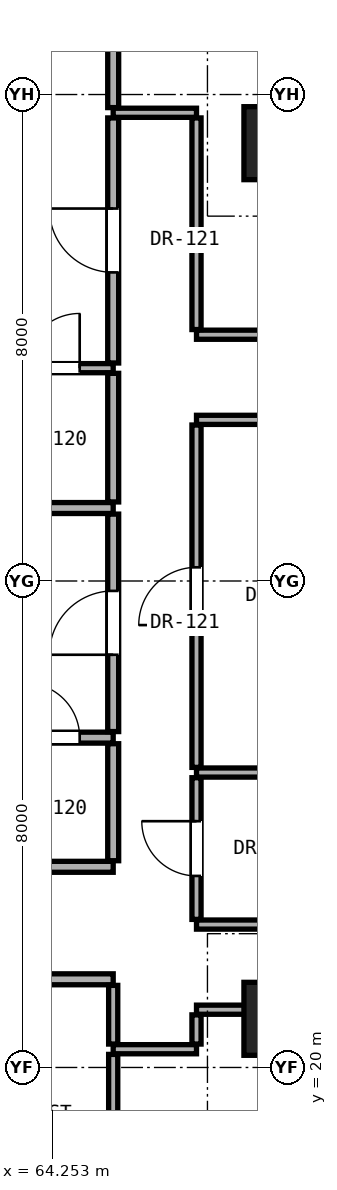
"""IFC4 building model, lengths in metres.
Left out: names, types, materials, properties, quantities, classifications, styles, units other than length and angle.
Written with IfcOpenShell. Run it as: python <this file> out.ifc"""

import sys

from ifc_helpers import new_model, si_unit, direction, frame, frame_2d, origin, origin_2d, place, context, subcontext, project, spatial, rectangle, extrude, element, fill, save


model = new_model("IFC4")
c1 = context("Model", 3, precision=1e-05, world=origin(), true_north=direction((0.0, 1.0)))
c2 = subcontext(c1, "Body", "Model", "MODEL_VIEW")
j1 = project(units=[si_unit("LENGTHUNIT", "METRE"), si_unit("PLANEANGLEUNIT", "RADIAN")], contexts=[c1])
p1 = place(None, origin())
s1 = spatial("IfcSite", under=j1, at=p1, CompositionType="ELEMENT")
p2 = place(p1, origin())
s2 = spatial("IfcBuilding", under=s1, at=p2, CompositionType="ELEMENT")
p3 = place(p2, frame((0.0, 0.0, 91.7)))
s3 = spatial("IfcBuildingStorey", under=s2, at=p3, CompositionType="ELEMENT", Elevation=91.7)
for number, where, z_axis, x_axis in (
    (1, (68.0, 20.8, 0.0), (0.0, 0.0, 1.0), (1.0, 0.0, 0.0)),
    (2, (68.0, 35.2, 0.0), (0.0, 0.0, 1.0), (1.0, 0.0, 0.0)),
):
    element("IfcColumn", number, at=place(p3, frame(where, z_axis=z_axis, x_axis=x_axis)), inside=s3, PredefinedType="COLUMN", context=c2, shape_type="SweptSolid", body=[
        extrude(rectangle(XDim=1.2, YDim=1.2, at=origin_2d()), origin(), (0.0, 0.0, 1.0), 3.3),
    ])
p4 = place(p3, frame((65.25, 20.3, 0.0), z_axis=(0.0, 0.0, 1.0), x_axis=(1.0, 0.0, 0.0)))
e3 = element("IfcWall", 3, at=p4, inside=s3, PredefinedType="PARTITIONING", context=c2, shape_type="SweptSolid", body=[
    extrude(rectangle(XDim=1.37, YDim=0.15, at=frame_2d((0.685, 0.0))), origin(), (0.0, 0.0, 1.0), 3.08),
])
p5 = place(p3, frame((66.62, 20.95, 0.0), z_axis=(0.0, 0.0, 1.0), x_axis=(1.0, 0.0, 0.0)))
e4 = element("IfcWall", 4, at=p5, inside=s3, PredefinedType="PARTITIONING", context=c2, shape_type="SweptSolid", body=[
    extrude(rectangle(XDim=1.06, YDim=0.15, at=frame_2d((0.53, 0.0))), origin(), (0.0, 0.0, 1.0), 2.472),
])
p6 = place(p3, frame((58.5, 21.45, 0.0), z_axis=(0.0, 0.0, 1.0), x_axis=(1.0, 0.0, 0.0)))
e5 = element("IfcWall", 5, at=p6, inside=s3, PredefinedType="PARTITIONING", context=c2, shape_type="SweptSolid", body=[
    extrude(rectangle(XDim=6.75, YDim=0.18, at=frame_2d((3.375, 0.0))), origin(), (0.0, 0.0, 1.0), 2.085),
])
p7 = place(p6, frame((4.355, 0.0, 0.0)))
e6 = element("IfcOpeningElement", 6, at=p7, cuts=e5, PredefinedType="OPENING", context=c2, shape_type="SweptSolid", body=[
    extrude(rectangle(XDim=0.85, YDim=2.01, at=frame_2d((0.425, 1.005))), frame((0.0, 0.1, 0.0), z_axis=(0.0, -1.0, 0.0), x_axis=(1.0, 0.0, 0.0)), (0.0, 0.0, 1.0), 0.2),
])
p8 = place(p3, frame((66.62, 22.35, 0.0), z_axis=(0.0, 0.0, 1.0), x_axis=(1.0, 0.0, 0.0)))
e7 = element("IfcWall", 7, at=p8, inside=s3, PredefinedType="PARTITIONING", context=c2, shape_type="SweptSolid", body=[
    extrude(rectangle(XDim=19.63, YDim=0.15, at=frame_2d((9.815, 0.0))), origin(), (0.0, 0.0, 1.0), 2.145),
])
p9 = place(p8, frame((12.085, 0.0, 0.0)))
e8 = element("IfcOpeningElement", 8, at=p9, cuts=e7, PredefinedType="OPENING", context=c2, shape_type="SweptSolid", body=[
    extrude(rectangle(XDim=0.85, YDim=2.01, at=frame_2d((0.425, 1.005))), frame((0.0, 0.085, 0.0), z_axis=(0.0, -1.0, 0.0), x_axis=(1.0, 0.0, 0.0)), (0.0, 0.0, 1.0), 0.17),
])
p10 = place(p3, frame((32.14, 23.3, 0.0), z_axis=(0.0, 0.0, 1.0), x_axis=(1.0, 0.0, 0.0)))
e9 = element("IfcWall", 9, at=p10, inside=s3, PredefinedType="PARTITIONING", context=c2, shape_type="SweptSolid", body=[
    extrude(rectangle(XDim=33.11, YDim=0.18, at=frame_2d((16.555, 0.0))), origin(), (0.0, 0.0, 1.0), 2.145),
])
p11 = place(p10, frame((11.525, 0.0, 0.0)))
e10 = element("IfcOpeningElement", 10, at=p11, cuts=e9, PredefinedType="OPENING", context=c2, shape_type="SweptSolid", body=[
    extrude(rectangle(XDim=0.85, YDim=2.01, at=frame_2d((0.425, 1.005))), frame((0.0, 0.1, 0.0), z_axis=(0.0, -1.0, 0.0), x_axis=(1.0, 0.0, 0.0)), (0.0, 0.0, 1.0), 0.2),
])
p12 = place(p10, frame((23.185, 0.0, 0.0)))
e11 = element("IfcOpeningElement", 11, at=p12, cuts=e9, PredefinedType="OPENING", context=c2, shape_type="SweptSolid", body=[
    extrude(rectangle(XDim=0.85, YDim=2.01, at=frame_2d((0.425, 1.005))), frame((0.0, 0.1, 0.0), z_axis=(0.0, -1.0, 0.0), x_axis=(1.0, 0.0, 0.0)), (0.0, 0.0, 1.0), 0.2),
])
p13 = place(p3, frame((66.62, 24.85, 0.0), z_axis=(0.0, 0.0, 1.0), x_axis=(1.0, 0.0, 0.0)))
e12 = element("IfcWall", 12, at=p13, inside=s3, PredefinedType="PARTITIONING", context=c2, shape_type="SweptSolid", body=[
    extrude(rectangle(XDim=3.13, YDim=0.15, at=frame_2d((1.565, 0.0))), origin(), (0.0, 0.0, 1.0), 2.145),
])
p14 = place(p3, frame((59.12, 25.424, 0.0), z_axis=(0.0, 0.0, 1.0), x_axis=(1.0, 0.0, 0.0)))
e13 = element("IfcWall", 13, at=p14, inside=s3, PredefinedType="PARTITIONING", context=c2, shape_type="SweptSolid", body=[
    extrude(rectangle(XDim=6.13, YDim=0.18, at=frame_2d((3.065, 0.0))), origin(), (0.0, 0.0, 1.0), 2.216),
])
p15 = place(p14, frame((1.629, 0.0, 0.0)))
e14 = element("IfcOpeningElement", 14, at=p15, cuts=e13, PredefinedType="OPENING", context=c2, shape_type="SweptSolid", body=[
    extrude(rectangle(XDim=0.95, YDim=2.15, at=frame_2d((0.475, 1.075))), frame((0.0, 0.1, 0.0), z_axis=(0.0, -1.0, 0.0), x_axis=(1.0, 0.0, 0.0)), (0.0, 0.0, 1.0), 0.2),
])
p16 = place(p14, frame((4.679, 0.0, 0.0)))
e15 = element("IfcOpeningElement", 15, at=p16, cuts=e13, PredefinedType="OPENING", context=c2, shape_type="SweptSolid", body=[
    extrude(rectangle(XDim=0.9, YDim=2.1, at=frame_2d((0.45, 1.05))), frame((0.0, 0.1, 0.0), z_axis=(0.0, -1.0, 0.0), x_axis=(1.0, 0.0, 0.0)), (0.0, 0.0, 1.0), 0.2),
])
p17 = place(p3, frame((59.12, 29.2, 0.0), z_axis=(0.0, 0.0, 1.0), x_axis=(1.0, 0.0, 0.0)))
e16 = element("IfcWall", 16, at=p17, inside=s3, PredefinedType="PARTITIONING", context=c2, shape_type="SweptSolid", body=[
    extrude(rectangle(XDim=6.13, YDim=0.18, at=frame_2d((3.065, 0.0))), origin(), (0.0, 0.0, 1.0), 2.216),
])
p18 = place(p3, frame((66.62, 30.65, 0.0), z_axis=(0.0, 0.0, 1.0), x_axis=(1.0, 0.0, 0.0)))
e17 = element("IfcWall", 17, at=p18, inside=s3, PredefinedType="PARTITIONING", context=c2, shape_type="SweptSolid", body=[
    extrude(rectangle(XDim=19.63, YDim=0.15, at=frame_2d((9.815, 0.0))), origin(), (0.0, 0.0, 1.0), 2.145),
])
p19 = place(p18, frame((3.855, 0.0, 0.0)))
e18 = element("IfcOpeningElement", 18, at=p19, cuts=e17, PredefinedType="OPENING", context=c2, shape_type="SweptSolid", body=[
    extrude(rectangle(XDim=0.85, YDim=2.01, at=frame_2d((0.425, 1.005))), frame((0.0, 0.085, 0.0), z_axis=(0.0, -1.0, 0.0), x_axis=(1.0, 0.0, 0.0)), (0.0, 0.0, 1.0), 0.17),
])
p20 = place(p18, frame((12.085, 0.0, 0.0)))
e19 = element("IfcOpeningElement", 19, at=p20, cuts=e17, PredefinedType="OPENING", context=c2, shape_type="SweptSolid", body=[
    extrude(rectangle(XDim=0.85, YDim=2.01, at=frame_2d((0.425, 1.005))), frame((0.0, 0.085, 0.0), z_axis=(0.0, -1.0, 0.0), x_axis=(1.0, 0.0, 0.0)), (0.0, 0.0, 1.0), 0.17),
])
p21 = place(p3, frame((59.12, 31.5, 0.0), z_axis=(0.0, 0.0, 1.0), x_axis=(1.0, 0.0, 0.0)))
e20 = element("IfcWall", 20, at=p21, inside=s3, PredefinedType="PARTITIONING", context=c2, shape_type="SweptSolid", body=[
    extrude(rectangle(XDim=6.13, YDim=0.15, at=frame_2d((3.065, 0.0))), origin(), (0.0, 0.0, 1.0), 2.216),
])
p22 = place(p21, frame((1.629, 0.0, 0.0)))
e21 = element("IfcOpeningElement", 21, at=p22, cuts=e20, PredefinedType="OPENING", context=c2, shape_type="SweptSolid", body=[
    extrude(rectangle(XDim=0.95, YDim=2.15, at=frame_2d((0.475, 1.075))), frame((0.0, 0.085, 0.0), z_axis=(0.0, -1.0, 0.0), x_axis=(1.0, 0.0, 0.0)), (0.0, 0.0, 1.0), 0.17),
])
p23 = place(p21, frame((4.679, 0.0, 0.0)))
e22 = element("IfcOpeningElement", 22, at=p23, cuts=e20, PredefinedType="OPENING", context=c2, shape_type="SweptSolid", body=[
    extrude(rectangle(XDim=0.9, YDim=2.1, at=frame_2d((0.45, 1.05))), frame((0.0, 0.085, 0.0), z_axis=(0.0, -1.0, 0.0), x_axis=(1.0, 0.0, 0.0)), (0.0, 0.0, 1.0), 0.17),
])
p24 = place(p3, frame((66.62, 32.05, 0.0), z_axis=(0.0, 0.0, 1.0), x_axis=(1.0, 0.0, 0.0)))
e23 = element("IfcWall", 23, at=p24, inside=s3, PredefinedType="PARTITIONING", context=c2, shape_type="SweptSolid", body=[
    extrude(rectangle(XDim=2.18, YDim=0.15, at=frame_2d((1.09, 0.0))), origin(), (0.0, 0.0, 1.0), 2.145),
])
p25 = place(p3, frame((65.25, 35.7, 0.0), z_axis=(0.0, 0.0, 1.0), x_axis=(1.0, 0.0, 0.0)))
e24 = element("IfcWall", 24, at=p25, inside=s3, PredefinedType="PARTITIONING", context=c2, shape_type="SweptSolid", body=[
    extrude(rectangle(XDim=1.37, YDim=0.15, at=frame_2d((0.685, 0.0))), origin(), (0.0, 0.0, 1.0), 3.08),
])
p26 = place(p3, frame((65.25, 16.92, 0.0), z_axis=(0.0, 0.0, 1.0), x_axis=(0.0, 1.0, 0.0)))
e25 = element("IfcWall", 25, at=p26, inside=s3, PredefinedType="PARTITIONING", context=c2, shape_type="SweptSolid", body=[
    extrude(rectangle(XDim=3.295, YDim=0.15, at=frame_2d((1.647, 0.0))), origin(), (0.0, 0.0, 1.0), 2.456),
])
p27 = place(p3, frame((65.25, 20.385, 0.0), z_axis=(0.0, 0.0, 1.0), x_axis=(0.0, 1.0, 0.0)))
e26 = element("IfcWall", 26, at=p27, inside=s3, PredefinedType="PARTITIONING", context=c2, shape_type="SweptSolid", body=[
    extrude(rectangle(XDim=0.965, YDim=0.15, at=frame_2d((0.482, 0.0))), origin(), (0.0, 0.0, 1.0), 2.472),
])
p28 = place(p3, frame((65.25, 23.4, 0.0), z_axis=(0.0, 0.0, 1.0), x_axis=(0.0, 1.0, 0.0)))
e27 = element("IfcWall", 27, at=p28, inside=s3, PredefinedType="PARTITIONING", context=c2, shape_type="SweptSolid", body=[
    extrude(rectangle(XDim=1.924, YDim=0.18, at=frame_2d((0.962, 0.0))), origin(), (0.0, 0.0, 1.0), 3.08),
])
p29 = place(p3, frame((65.25, 25.524, 0.0), z_axis=(0.0, 0.0, 1.0), x_axis=(0.0, 1.0, 0.0)))
e28 = element("IfcWall", 28, at=p29, inside=s3, PredefinedType="PARTITIONING", context=c2, shape_type="SweptSolid", body=[
    extrude(rectangle(XDim=3.576, YDim=0.18, at=frame_2d((1.788, 0.0))), origin(), (0.0, 0.0, 1.0), 2.299),
])
p30 = place(p29, frame((1.263, 0.0, 0.0)))
e29 = element("IfcOpeningElement", 29, at=p30, cuts=e28, PredefinedType="OPENING", context=c2, shape_type="SweptSolid", body=[
    extrude(rectangle(XDim=1.05, YDim=2.2, at=frame_2d((0.525, 1.1))), frame((0.0, 0.1, 0.0), z_axis=(0.0, -1.0, 0.0), x_axis=(1.0, 0.0, 0.0)), (0.0, 0.0, 1.0), 0.2),
])
p31 = place(p3, frame((65.25, 29.3, 0.0), z_axis=(0.0, 0.0, 1.0), x_axis=(0.0, 1.0, 0.0)))
e30 = element("IfcWall", 30, at=p31, inside=s3, PredefinedType="PARTITIONING", context=c2, shape_type="SweptSolid", body=[
    extrude(rectangle(XDim=2.115, YDim=0.18, at=frame_2d((1.058, 0.0))), origin(), (0.0, 0.0, 1.0), 3.08),
])
p32 = place(p3, frame((65.25, 31.585, 0.0), z_axis=(0.0, 0.0, 1.0), x_axis=(0.0, 1.0, 0.0)))
e31 = element("IfcWall", 31, at=p32, inside=s3, PredefinedType="PARTITIONING", context=c2, shape_type="SweptSolid", body=[
    extrude(rectangle(XDim=4.03, YDim=0.18, at=frame_2d((2.015, 0.0))), origin(), (0.0, 0.0, 1.0), 2.472),
])
p33 = place(p32, frame((1.49, 0.0, 0.0)))
e32 = element("IfcOpeningElement", 32, at=p33, cuts=e31, PredefinedType="OPENING", context=c2, shape_type="SweptSolid", body=[
    extrude(rectangle(XDim=1.05, YDim=2.2, at=frame_2d((0.525, 1.1))), frame((0.0, 0.1, 0.0), z_axis=(0.0, -1.0, 0.0), x_axis=(1.0, 0.0, 0.0)), (0.0, 0.0, 1.0), 0.2),
])
p34 = place(p3, frame((65.25, 35.785, 0.0), z_axis=(0.0, 0.0, 1.0), x_axis=(0.0, 1.0, 0.0)))
e33 = element("IfcWall", 33, at=p34, inside=s3, PredefinedType="PARTITIONING", context=c2, shape_type="SweptSolid", body=[
    extrude(rectangle(XDim=3.294, YDim=0.18, at=frame_2d((1.647, 0.0))), origin(), (0.0, 0.0, 1.0), 2.456),
])
p35 = place(p3, frame((66.62, 20.385, 0.0), z_axis=(0.0, 0.0, 1.0), x_axis=(0.0, 1.0, 0.0)))
e34 = element("IfcWall", 34, at=p35, inside=s3, PredefinedType="PARTITIONING", context=c2, shape_type="SweptSolid", body=[
    extrude(rectangle(XDim=0.48, YDim=0.15, at=frame_2d((0.24, 0.0))), origin(), (0.0, 0.0, 1.0), 2.472),
])
p36 = place(p3, frame((66.62, 22.435, 0.0), z_axis=(0.0, 0.0, 1.0), x_axis=(0.0, 1.0, 0.0)))
e35 = element("IfcWall", 35, at=p36, inside=s3, PredefinedType="PARTITIONING", context=c2, shape_type="SweptSolid", body=[
    extrude(rectangle(XDim=2.33, YDim=0.15, at=frame_2d((1.165, 0.0))), origin(), (0.0, 0.0, 1.0), 3.08),
])
p37 = place(p36, frame((0.715, 0.0, 0.0)))
e36 = element("IfcOpeningElement", 36, at=p37, cuts=e35, PredefinedType="OPENING", context=c2, shape_type="SweptSolid", body=[
    extrude(rectangle(XDim=0.9, YDim=2.1, at=frame_2d((0.45, 1.05))), frame((0.0, 0.085, 0.0), z_axis=(0.0, -1.0, 0.0), x_axis=(1.0, 0.0, 0.0)), (0.0, 0.0, 1.0), 0.17),
])
p38 = place(p3, frame((66.62, 24.935, 0.0), z_axis=(0.0, 0.0, 1.0), x_axis=(0.0, 1.0, 0.0)))
e37 = element("IfcWall", 37, at=p38, inside=s3, PredefinedType="PARTITIONING", context=c2, shape_type="SweptSolid", body=[
    extrude(rectangle(XDim=5.63, YDim=0.15, at=frame_2d((2.815, 0.0))), origin(), (0.0, 0.0, 1.0), 2.299),
])
p39 = place(p38, frame((2.34, 0.0, 0.0)))
e38 = element("IfcOpeningElement", 38, at=p39, cuts=e37, PredefinedType="OPENING", context=c2, shape_type="SweptSolid", body=[
    extrude(rectangle(XDim=0.95, YDim=2.15, at=frame_2d((0.475, 1.075))), frame((0.0, 0.085, 0.0), z_axis=(0.0, -1.0, 0.0), x_axis=(1.0, 0.0, 0.0)), (0.0, 0.0, 1.0), 0.17),
])
p40 = place(p3, frame((66.62, 32.135, 0.0), z_axis=(0.0, 0.0, 1.0), x_axis=(0.0, 1.0, 0.0)))
e39 = element("IfcWall", 39, at=p40, inside=s3, PredefinedType="PARTITIONING", context=c2, shape_type="SweptSolid", body=[
    extrude(rectangle(XDim=3.48, YDim=0.15, at=frame_2d((1.74, 0.0))), origin(), (0.0, 0.0, 1.0), 2.472),
])
p41 = place(p37, origin())
e40 = element("IfcDoor", 40, at=p41, inside=s3, OperationType="SINGLE_SWING_RIGHT", PredefinedType="DOOR", context=c2, shape_type="SweptSolid", body=[
    extrude(rectangle(XDim=0.9, YDim=2.1, at=frame_2d((0.45, 1.05))), frame((0.0, 0.025, 0.0), z_axis=(0.0, -1.0, 0.0), x_axis=(1.0, 0.0, 0.0)), (0.0, 0.0, 1.0), 0.05),
])
fill(e36, e40)
p42 = place(p30, origin())
e41 = element("IfcDoor", 41, at=p42, inside=s3, OperationType="SINGLE_SWING_LEFT", PredefinedType="DOOR", context=c2, shape_type="SweptSolid", body=[
    extrude(rectangle(XDim=1.05, YDim=2.2, at=frame_2d((0.525, 1.1))), frame((0.0, 0.025, 0.0), z_axis=(0.0, -1.0, 0.0), x_axis=(1.0, 0.0, 0.0)), (0.0, 0.0, 1.0), 0.05),
])
fill(e29, e41)
p43 = place(p16, origin())
e42 = element("IfcDoor", 42, at=p43, inside=s3, OperationType="SINGLE_SWING_LEFT", PredefinedType="DOOR", context=c2, shape_type="SweptSolid", body=[
    extrude(rectangle(XDim=0.9, YDim=2.1, at=frame_2d((0.45, 1.05))), frame((0.0, 0.025, 0.0), z_axis=(0.0, -1.0, 0.0), x_axis=(1.0, 0.0, 0.0)), (0.0, 0.0, 1.0), 0.05),
])
fill(e15, e42)
p44 = place(p33, origin())
e43 = element("IfcDoor", 43, at=p44, inside=s3, OperationType="SINGLE_SWING_RIGHT", PredefinedType="DOOR", context=c2, shape_type="SweptSolid", body=[
    extrude(rectangle(XDim=1.05, YDim=2.2, at=frame_2d((0.525, 1.1))), frame((0.0, 0.025, 0.0), z_axis=(0.0, -1.0, 0.0), x_axis=(1.0, 0.0, 0.0)), (0.0, 0.0, 1.0), 0.05),
])
fill(e32, e43)
p45 = place(p23, origin())
e44 = element("IfcDoor", 44, at=p45, inside=s3, OperationType="SINGLE_SWING_RIGHT", PredefinedType="DOOR", context=c2, shape_type="SweptSolid", body=[
    extrude(rectangle(XDim=0.9, YDim=2.1, at=frame_2d((0.45, 1.05))), frame((0.0, 0.025, 0.0), z_axis=(0.0, -1.0, 0.0), x_axis=(1.0, 0.0, 0.0)), (0.0, 0.0, 1.0), 0.05),
])
fill(e22, e44)
p46 = place(p39, origin())
e45 = element("IfcDoor", 45, at=p46, inside=s3, OperationType="SINGLE_SWING_LEFT", PredefinedType="DOOR", context=c2, shape_type="SweptSolid", body=[
    extrude(rectangle(XDim=0.95, YDim=2.15, at=frame_2d((0.475, 1.075))), frame((0.0, 0.025, 0.0), z_axis=(0.0, -1.0, 0.0), x_axis=(1.0, 0.0, 0.0)), (0.0, 0.0, 1.0), 0.05),
])
fill(e38, e45)
save(model, sys.argv[1])
